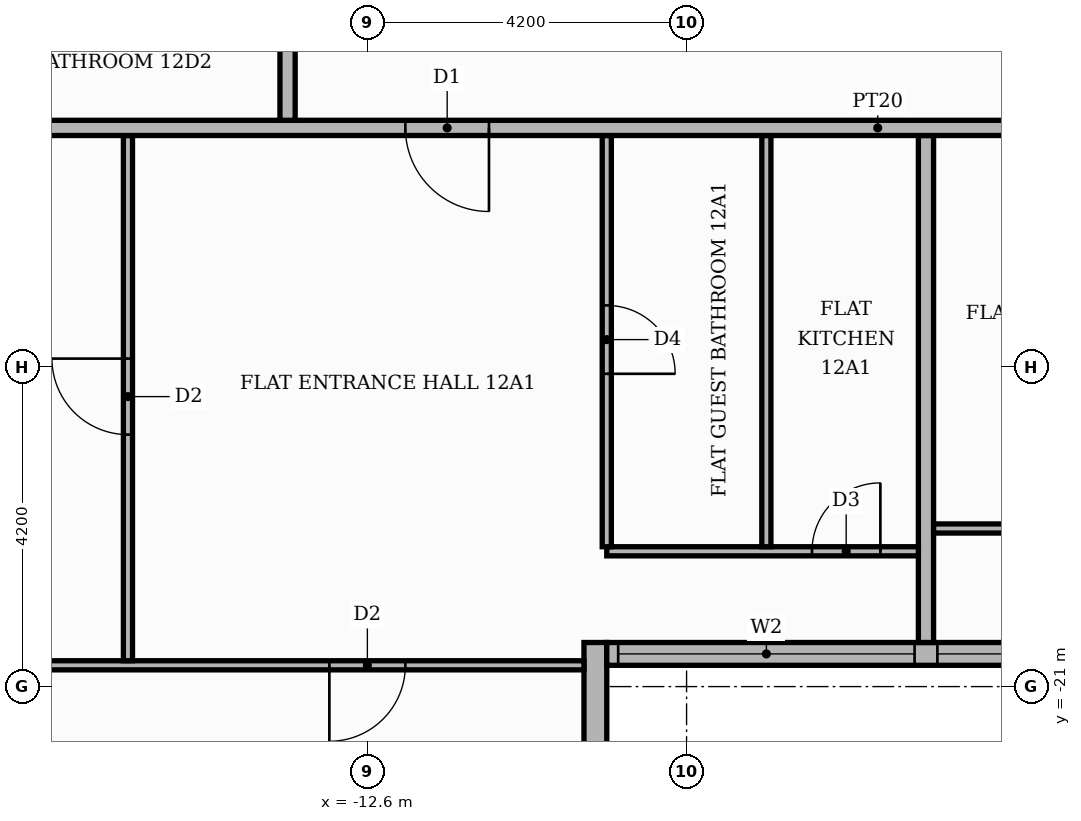
"""IFC4 building model, lengths in metres.
Left out: names, types, materials, properties, quantities, classifications, styles, units other than length and angle.
Written with IfcOpenShell. Run it as: python <this file> out.ifc"""

import sys

from ifc_helpers import new_model, si_unit, direction, frame, frame_2d, origin, place, context, subcontext, project, spatial, rectangle, extrude, element, fill, save


model = new_model("IFC4")
c1 = context("Model", 3, precision=1e-05, world=origin(), true_north=direction((0.0, 1.0)))
c2 = subcontext(c1, "Body", "Model", "MODEL_VIEW")
j1 = project(units=[si_unit("LENGTHUNIT", "METRE"), si_unit("PLANEANGLEUNIT", "RADIAN")], contexts=[c1])
p1 = place(None, origin())
s1 = spatial("IfcSite", under=j1, at=p1, CompositionType="ELEMENT")
p2 = place(p1, origin())
s2 = spatial("IfcBuilding", under=s1, at=p2, CompositionType="ELEMENT")
p3 = place(p2, frame((0.0, 0.0, 54.3)))
s3 = spatial("IfcBuildingStorey", under=s2, at=p3, CompositionType="ELEMENT", Elevation=54.3)
p4 = place(p3, frame((-9.6, -25.42, 0.0), z_axis=(0.0, 0.0, 1.0), x_axis=(0.0, 1.0, 0.0)))
e1 = element("IfcWall", 1, at=p4, inside=s3, PredefinedType="STANDARD", context=c2, shape_type="SweptSolid", body=[
    extrude(rectangle(XDim=5.0, YDim=0.3, at=frame_2d((2.5, 0.0))), origin(), (0.0, 0.0, 1.0), 3.48),
])
p5 = place(p4, frame((1.42, 0.0, 0.9)))
e2 = element("IfcOpeningElement", 2, at=p5, cuts=e1, PredefinedType="OPENING", context=c2, shape_type="SweptSolid", body=[
    extrude(rectangle(XDim=1.8, YDim=2.1, at=frame_2d((0.9, 1.05))), frame((0.0, 0.16, 0.0), z_axis=(0.0, -1.0, 0.0), x_axis=(1.0, 0.0, 0.0)), (0.0, 0.0, 1.0), 0.32),
])
p6 = place(p3, frame((-9.45, -20.57, 0.0), z_axis=(0.0, 0.0, 1.0), x_axis=(1.0, 0.0, 0.0)))
e3 = element("IfcWall", 3, at=p6, inside=s3, PredefinedType="STANDARD", context=c2, shape_type="SweptSolid", body=[
    extrude(rectangle(XDim=19.2, YDim=0.3, at=frame_2d((9.6, 0.0))), origin(), (0.0, 0.0, 1.0), 3.48),
])
p7 = place(p6, frame((0.15, 0.0, 0.9)))
e4 = element("IfcOpeningElement", 4, at=p7, cuts=e3, PredefinedType="OPENING", context=c2, shape_type="SweptSolid", body=[
    extrude(rectangle(XDim=3.9, YDim=2.1, at=frame_2d((1.95, 1.05))), frame((0.0, 0.16, 0.0), z_axis=(0.0, -1.0, 0.0), x_axis=(1.0, 0.0, 0.0)), (0.0, 0.0, 1.0), 0.32),
])
p8 = place(p6, frame((4.35, 0.0, 0.9)))
e5 = element("IfcOpeningElement", 5, at=p8, cuts=e3, PredefinedType="OPENING", context=c2, shape_type="SweptSolid", body=[
    extrude(rectangle(XDim=6.0, YDim=2.1, at=frame_2d((3.0, 1.05))), frame((0.0, 0.16, 0.0), z_axis=(0.0, -1.0, 0.0), x_axis=(1.0, 0.0, 0.0)), (0.0, 0.0, 1.0), 0.32),
])
p9 = place(p6, frame((10.65, 0.0, 0.9)))
e6 = element("IfcOpeningElement", 6, at=p9, cuts=e3, PredefinedType="OPENING", context=c2, shape_type="SweptSolid", body=[
    extrude(rectangle(XDim=6.0, YDim=2.1, at=frame_2d((3.0, 1.05))), frame((0.0, 0.16, 0.0), z_axis=(0.0, -1.0, 0.0), x_axis=(1.0, 0.0, 0.0)), (0.0, 0.0, 1.0), 0.32),
])
p10 = place(p6, frame((16.95, 0.0, 0.9)))
e7 = element("IfcOpeningElement", 7, at=p10, cuts=e3, PredefinedType="OPENING", context=c2, shape_type="SweptSolid", body=[
    extrude(rectangle(XDim=1.8, YDim=2.1, at=frame_2d((0.9, 1.05))), frame((0.0, 0.16, 0.0), z_axis=(0.0, -1.0, 0.0), x_axis=(1.0, 0.0, 0.0)), (0.0, 0.0, 1.0), 0.32),
])
p11 = place(p3, frame((-25.42, -20.72, 0.0), z_axis=(0.0, 0.0, 1.0), x_axis=(1.0, 0.0, 0.0)))
e8 = element("IfcWall", 8, at=p11, inside=s3, PredefinedType="PARTITIONING", context=c2, shape_type="SweptSolid", body=[
    extrude(rectangle(XDim=15.67, YDim=0.12, at=frame_2d((7.835, 0.0))), origin(), (0.0, 0.0, 1.0), 3.48),
])
p12 = place(p11, frame((12.32, 0.0, 0.0)))
e9 = element("IfcOpeningElement", 9, at=p12, cuts=e8, PredefinedType="OPENING", context=c2, shape_type="SweptSolid", body=[
    extrude(rectangle(XDim=1.0, YDim=2.1, at=frame_2d((0.5, 1.05))), frame((0.0, 0.07, 0.0), z_axis=(0.0, -1.0, 0.0), x_axis=(1.0, 0.0, 0.0)), (0.0, 0.0, 1.0), 0.14),
])
p13 = place(p3, frame((-5.25, -20.42, 0.0), z_axis=(0.0, 0.0, 1.0), x_axis=(0.0, 1.0, 0.0)))
e10 = element("IfcWall", 10, at=p13, inside=s3, PredefinedType="PARTITIONING", context=c2, shape_type="SweptSolid", body=[
    extrude(rectangle(XDim=6.67, YDim=0.2, at=frame_2d((3.335, 0.0))), origin(), (0.0, 0.0, 1.0), 3.48),
])
p14 = place(p3, frame((-15.75, -20.66, 0.0), z_axis=(0.0, 0.0, 1.0), x_axis=(0.0, 1.0, 0.0)))
e11 = element("IfcWall", 11, at=p14, inside=s3, PredefinedType="PARTITIONING", context=c2, shape_type="SweptSolid", body=[
    extrude(rectangle(XDim=6.91, YDim=0.12, at=frame_2d((3.455, 0.0))), origin(), (0.0, 0.0, 1.0), 3.48),
])
p15 = place(p14, frame((2.975, 0.0, 0.0)))
e12 = element("IfcOpeningElement", 12, at=p15, cuts=e11, PredefinedType="OPENING", context=c2, shape_type="SweptSolid", body=[
    extrude(rectangle(XDim=1.0, YDim=2.1, at=frame_2d((0.5, 1.05))), frame((0.0, 0.07, 0.0), z_axis=(0.0, -1.0, 0.0), x_axis=(1.0, 0.0, 0.0)), (0.0, 0.0, 1.0), 0.14),
])
p16 = place(p3, frame((-9.45, -19.22, 0.0), z_axis=(0.0, 0.0, 1.0), x_axis=(1.0, 0.0, 0.0)))
e13 = element("IfcWall", 13, at=p16, inside=s3, PredefinedType="PARTITIONING", context=c2, shape_type="SweptSolid", body=[
    extrude(rectangle(XDim=4.1, YDim=0.12, at=frame_2d((2.05, 0.0))), origin(), (0.0, 0.0, 1.0), 3.48),
])
p17 = place(p16, frame((2.7, 0.0, 0.0)))
e14 = element("IfcOpeningElement", 14, at=p17, cuts=e13, PredefinedType="OPENING", context=c2, shape_type="SweptSolid", body=[
    extrude(rectangle(XDim=0.9, YDim=2.1, at=frame_2d((0.45, 1.05))), frame((0.0, 0.07, 0.0), z_axis=(0.0, -1.0, 0.0), x_axis=(1.0, 0.0, 0.0)), (0.0, 0.0, 1.0), 0.14),
])
p18 = place(p3, frame((-9.45, -19.16, 0.0), z_axis=(0.0, 0.0, 1.0), x_axis=(0.0, 1.0, 0.0)))
e15 = element("IfcWall", 15, at=p18, inside=s3, PredefinedType="PARTITIONING", context=c2, shape_type="SweptSolid", body=[
    extrude(rectangle(XDim=5.41, YDim=0.12, at=frame_2d((2.705, 0.0))), origin(), (0.0, 0.0, 1.0), 3.48),
])
p19 = place(p18, frame((2.275, 0.0, 0.0)))
e16 = element("IfcOpeningElement", 16, at=p19, cuts=e15, PredefinedType="OPENING", context=c2, shape_type="SweptSolid", body=[
    extrude(rectangle(XDim=0.9, YDim=2.1, at=frame_2d((0.45, 1.05))), frame((0.0, 0.07, 0.0), z_axis=(0.0, -1.0, 0.0), x_axis=(1.0, 0.0, 0.0)), (0.0, 0.0, 1.0), 0.14),
])
p20 = place(p3, frame((-7.35, -19.16, 0.0), z_axis=(0.0, 0.0, 1.0), x_axis=(0.0, 1.0, 0.0)))
e17 = element("IfcWall", 17, at=p20, inside=s3, PredefinedType="PARTITIONING", context=c2, shape_type="SweptSolid", body=[
    extrude(rectangle(XDim=5.41, YDim=0.12, at=frame_2d((2.705, 0.0))), origin(), (0.0, 0.0, 1.0), 3.48),
])
p21 = place(p3, frame((-5.15, -18.92, 0.0), z_axis=(0.0, 0.0, 1.0), x_axis=(1.0, 0.0, 0.0)))
e18 = element("IfcWall", 18, at=p21, inside=s3, PredefinedType="PARTITIONING", context=c2, shape_type="SweptSolid", body=[
    extrude(rectangle(XDim=4.1, YDim=0.12, at=frame_2d((2.05, 0.0))), origin(), (0.0, 0.0, 1.0), 3.48),
])
p22 = place(p3, frame((-25.42, -13.65, 0.0), z_axis=(0.0, 0.0, 1.0), x_axis=(1.0, 0.0, 0.0)))
e19 = element("IfcWall", 19, at=p22, inside=s3, PredefinedType="PARTITIONING", context=c2, shape_type="SweptSolid", body=[
    extrude(rectangle(XDim=39.07, YDim=0.2, at=frame_2d((19.535, 0.0))), origin(), (0.0, 0.0, 1.0), 3.48),
])
p23 = place(p22, frame((13.32, 0.0, 0.0)))
e20 = element("IfcOpeningElement", 20, at=p23, cuts=e19, PredefinedType="OPENING", context=c2, shape_type="SweptSolid", body=[
    extrude(rectangle(XDim=1.1, YDim=2.4, at=frame_2d((0.55, 1.2))), frame((0.0, 0.11, 0.0), z_axis=(0.0, -1.0, 0.0), x_axis=(1.0, 0.0, 0.0)), (0.0, 0.0, 1.0), 0.22),
])
p24 = place(p22, frame((25.92, 0.0, 0.0)))
e21 = element("IfcOpeningElement", 21, at=p24, cuts=e19, PredefinedType="OPENING", context=c2, shape_type="SweptSolid", body=[
    extrude(rectangle(XDim=1.1, YDim=2.4, at=frame_2d((0.55, 1.2))), frame((0.0, 0.11, 0.0), z_axis=(0.0, -1.0, 0.0), x_axis=(1.0, 0.0, 0.0)), (0.0, 0.0, 1.0), 0.22),
])
p25 = place(p3, frame((-13.65, -13.55, 0.0), z_axis=(0.0, 0.0, 1.0), x_axis=(0.0, 1.0, 0.0)))
e22 = element("IfcWall", 22, at=p25, inside=s3, PredefinedType="PARTITIONING", context=c2, shape_type="SweptSolid", body=[
    extrude(rectangle(XDim=18.7, YDim=0.2, at=frame_2d((9.35, 0.0))), origin(), (0.0, 0.0, 1.0), 3.48),
])
p26 = place(p25, frame((11.95, 0.0, 0.0)))
e23 = element("IfcOpeningElement", 23, at=p26, cuts=e22, PredefinedType="OPENING", context=c2, shape_type="SweptSolid", body=[
    extrude(rectangle(XDim=1.1, YDim=2.4, at=frame_2d((0.55, 1.2))), frame((0.0, 0.11, 0.0), z_axis=(0.0, -1.0, 0.0), x_axis=(1.0, 0.0, 0.0)), (0.0, 0.0, 1.0), 0.22),
])
p27 = place(p7, origin())
e24 = element("IfcWindow", 24, at=p27, inside=s3, PartitioningType="SINGLE_PANEL", PredefinedType="WINDOW", context=c2, shape_type="SweptSolid", body=[
    extrude(rectangle(XDim=3.9, YDim=2.1, at=frame_2d((1.95, 1.05))), frame((0.0, 0.03, 0.0), z_axis=(0.0, -1.0, 0.0), x_axis=(1.0, 0.0, 0.0)), (0.0, 0.0, 1.0), 0.06),
])
fill(e4, e24)
p28 = place(p8, origin())
e25 = element("IfcWindow", 25, at=p28, inside=s3, PartitioningType="SINGLE_PANEL", PredefinedType="WINDOW", context=c2, shape_type="SweptSolid", body=[
    extrude(rectangle(XDim=6.0, YDim=2.1, at=frame_2d((3.0, 1.05))), frame((0.0, 0.03, 0.0), z_axis=(0.0, -1.0, 0.0), x_axis=(1.0, 0.0, 0.0)), (0.0, 0.0, 1.0), 0.06),
])
fill(e5, e25)
p29 = place(p23, frame((1.1, 0.0, 0.0), z_axis=(0.0, 0.0, 1.0), x_axis=(-1.0, 0.0, 0.0)))
e26 = element("IfcDoor", 26, at=p29, inside=s3, OperationType="SINGLE_SWING_RIGHT", PredefinedType="DOOR", context=c2, shape_type="SweptSolid", body=[
    extrude(rectangle(XDim=1.1, YDim=2.4, at=frame_2d((0.55, 1.2))), frame((0.0, 0.025, 0.0), z_axis=(0.0, -1.0, 0.0), x_axis=(1.0, 0.0, 0.0)), (0.0, 0.0, 1.0), 0.05),
])
fill(e20, e26)
p30 = place(p15, origin())
e27 = element("IfcDoor", 27, at=p30, inside=s3, OperationType="SINGLE_SWING_RIGHT", PredefinedType="DOOR", context=c2, shape_type="SweptSolid", body=[
    extrude(rectangle(XDim=1.0, YDim=2.1, at=frame_2d((0.5, 1.05))), frame((0.0, 0.025, 0.0), z_axis=(0.0, -1.0, 0.0), x_axis=(1.0, 0.0, 0.0)), (0.0, 0.0, 1.0), 0.05),
])
fill(e12, e27)
p31 = place(p19, frame((0.9, 0.0, 0.0), z_axis=(0.0, 0.0, 1.0), x_axis=(-1.0, 0.0, 0.0)))
e28 = element("IfcDoor", 28, at=p31, inside=s3, OperationType="SINGLE_SWING_LEFT", PredefinedType="DOOR", context=c2, shape_type="SweptSolid", body=[
    extrude(rectangle(XDim=0.9, YDim=2.1, at=frame_2d((0.45, 1.05))), frame((0.0, 0.025, 0.0), z_axis=(0.0, -1.0, 0.0), x_axis=(1.0, 0.0, 0.0)), (0.0, 0.0, 1.0), 0.05),
])
fill(e16, e28)
p32 = place(p17, origin())
e29 = element("IfcDoor", 29, at=p32, inside=s3, OperationType="SINGLE_SWING_RIGHT", PredefinedType="DOOR", context=c2, shape_type="SweptSolid", body=[
    extrude(rectangle(XDim=0.9, YDim=2.1, at=frame_2d((0.45, 1.05))), frame((0.0, 0.025, 0.0), z_axis=(0.0, -1.0, 0.0), x_axis=(1.0, 0.0, 0.0)), (0.0, 0.0, 1.0), 0.05),
])
fill(e14, e29)
p33 = place(p12, frame((1.0, 0.0, 0.0), z_axis=(0.0, 0.0, 1.0), x_axis=(-1.0, 0.0, 0.0)))
e30 = element("IfcDoor", 30, at=p33, inside=s3, OperationType="SINGLE_SWING_LEFT", PredefinedType="DOOR", context=c2, shape_type="SweptSolid", body=[
    extrude(rectangle(XDim=1.0, YDim=2.1, at=frame_2d((0.5, 1.05))), frame((0.0, 0.025, 0.0), z_axis=(0.0, -1.0, 0.0), x_axis=(1.0, 0.0, 0.0)), (0.0, 0.0, 1.0), 0.05),
])
fill(e9, e30)
save(model, sys.argv[1])
